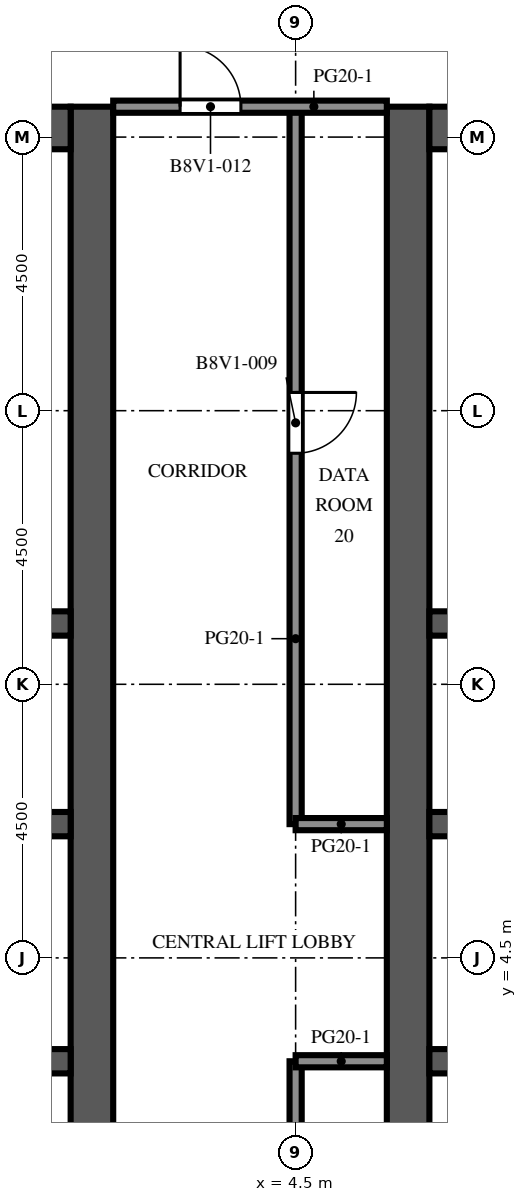
"""IFC4 building model, lengths in metres.
Left out: names, types, materials, properties, quantities, classifications, styles, units other than length and angle.
Written with IfcOpenShell. Run it as: python <this file> out.ifc"""

import sys

from ifc_helpers import new_model, si_unit, direction, frame, frame_2d, origin, place, context, subcontext, project, spatial, rectangle, extrude, element, fill, save


model = new_model("IFC4")
c1 = context("Model", 3, precision=1e-05, world=origin(), true_north=direction((0.0, 1.0)))
c2 = subcontext(c1, "Body", "Model", "MODEL_VIEW")
j1 = project(units=[si_unit("LENGTHUNIT", "METRE"), si_unit("PLANEANGLEUNIT", "RADIAN")], contexts=[c1])
p1 = place(None, origin())
s1 = spatial("IfcSite", under=j1, at=p1, CompositionType="ELEMENT")
p2 = place(p1, origin())
s2 = spatial("IfcBuilding", under=s1, at=p2, CompositionType="ELEMENT")
p3 = place(p2, frame((0.0, 0.0, 270.4)))
s3 = spatial("IfcBuildingStorey", under=s2, at=p3, CompositionType="ELEMENT", Elevation=270.4)
p4 = place(p3, frame((1.15, -9.0, 0.0), z_axis=(0.0, 0.0, 1.0), x_axis=(0.0, 1.0, 0.0)))
e1 = element("IfcWall", 1, at=p4, inside=s3, PredefinedType="SHEAR", context=c2, shape_type="SweptSolid", body=[
    extrude(rectangle(XDim=27.5, YDim=0.7, at=frame_2d((13.75, 0.0))), origin(), (0.0, 0.0, 1.0), 4.1),
])
p5 = place(p4, frame((12.55, 0.0, 0.0)))
e2 = element("IfcOpeningElement", 2, at=p5, cuts=e1, PredefinedType="OPENING", context=c2, shape_type="SweptSolid", body=[
    extrude(rectangle(XDim=2.4, YDim=2.4, at=frame_2d((1.2, 1.2))), frame((0.0, 0.36, 0.0), z_axis=(0.0, -1.0, 0.0), x_axis=(1.0, 0.0, 0.0)), (0.0, 0.0, 1.0), 0.72),
])
p6 = place(p4, frame((3.9, 0.0, 0.0)))
e3 = element("IfcOpeningElement", 3, at=p6, cuts=e1, PredefinedType="OPENING", context=c2, shape_type="SweptSolid", body=[
    extrude(rectangle(XDim=1.2, YDim=2.1, at=frame_2d((0.6, 1.05))), frame((0.0, 0.36, 0.0), z_axis=(0.0, -1.0, 0.0), x_axis=(1.0, 0.0, 0.0)), (0.0, 0.0, 1.0), 0.72),
])
p7 = place(p4, frame((19.46, 0.0, 0.0)))
e4 = element("IfcOpeningElement", 4, at=p7, cuts=e1, PredefinedType="OPENING", context=c2, shape_type="SweptSolid", body=[
    extrude(rectangle(XDim=1.0, YDim=2.1, at=frame_2d((0.5, 1.05))), frame((0.0, 0.36, 0.0), z_axis=(0.0, -1.0, 0.0), x_axis=(1.0, 0.0, 0.0)), (0.0, 0.0, 1.0), 0.72),
])
p8 = place(p4, frame((21.17, 0.0, 0.0)))
e5 = element("IfcOpeningElement", 5, at=p8, cuts=e1, PredefinedType="OPENING", context=c2, shape_type="SweptSolid", body=[
    extrude(rectangle(XDim=1.0, YDim=2.1, at=frame_2d((0.5, 1.05))), frame((0.0, 0.36, 0.0), z_axis=(0.0, -1.0, 0.0), x_axis=(1.0, 0.0, 0.0)), (0.0, 0.0, 1.0), 0.72),
])
p9 = place(p4, frame((23.26, 0.0, 0.0)))
e6 = element("IfcOpeningElement", 6, at=p9, cuts=e1, PredefinedType="OPENING", context=c2, shape_type="SweptSolid", body=[
    extrude(rectangle(XDim=1.0, YDim=2.1, at=frame_2d((0.5, 1.05))), frame((0.0, 0.36, 0.0), z_axis=(0.0, -1.0, 0.0), x_axis=(1.0, 0.0, 0.0)), (0.0, 0.0, 1.0), 0.72),
])
p10 = place(p4, frame((25.35, 0.0, 0.0)))
e7 = element("IfcOpeningElement", 7, at=p10, cuts=e1, PredefinedType="OPENING", context=c2, shape_type="SweptSolid", body=[
    extrude(rectangle(XDim=1.0, YDim=2.1, at=frame_2d((0.5, 1.05))), frame((0.0, 0.36, 0.0), z_axis=(0.0, -1.0, 0.0), x_axis=(1.0, 0.0, 0.0)), (0.0, 0.0, 1.0), 0.72),
])
p11 = place(p3, frame((-9.8, 18.15, 0.0), z_axis=(0.0, 0.0, 1.0), x_axis=(1.0, 0.0, 0.0)))
e8 = element("IfcWall", 8, at=p11, inside=s3, PredefinedType="SHEAR", context=c2, shape_type="SweptSolid", body=[
    extrude(rectangle(XDim=10.6, YDim=0.7, at=frame_2d((5.3, 0.0))), origin(), (0.0, 0.0, 1.0), 4.1),
])
p12 = place(p3, frame((-9.8, 2.8, 0.0), z_axis=(0.0, 0.0, 1.0), x_axis=(1.0, 0.0, 0.0)))
e9 = element("IfcWall", 9, at=p12, inside=s3, PredefinedType="SHEAR", context=c2, shape_type="SweptSolid", body=[
    extrude(rectangle(XDim=10.6, YDim=0.4, at=frame_2d((5.3, 0.0))), origin(), (0.0, 0.0, 1.0), 4.1),
])
p13 = place(p12, frame((0.688, 0.0, 0.0)))
e10 = element("IfcOpeningElement", 10, at=p13, cuts=e9, PredefinedType="OPENING", context=c2, shape_type="SweptSolid", body=[
    extrude(rectangle(XDim=1.1, YDim=2.1, at=frame_2d((0.55, 1.05))), frame((0.0, 0.21, 0.0), z_axis=(0.0, -1.0, 0.0), x_axis=(1.0, 0.0, 0.0)), (0.0, 0.0, 1.0), 0.42),
])
p14 = place(p12, frame((3.438, 0.0, 0.0)))
e11 = element("IfcOpeningElement", 11, at=p14, cuts=e9, PredefinedType="OPENING", context=c2, shape_type="SweptSolid", body=[
    extrude(rectangle(XDim=1.1, YDim=2.1, at=frame_2d((0.55, 1.05))), frame((0.0, 0.21, 0.0), z_axis=(0.0, -1.0, 0.0), x_axis=(1.0, 0.0, 0.0)), (0.0, 0.0, 1.0), 0.42),
])
p15 = place(p12, frame((6.113, 0.0, 0.0)))
e12 = element("IfcOpeningElement", 12, at=p15, cuts=e9, PredefinedType="OPENING", context=c2, shape_type="SweptSolid", body=[
    extrude(rectangle(XDim=1.0, YDim=2.1, at=frame_2d((0.5, 1.05))), frame((0.0, 0.21, 0.0), z_axis=(0.0, -1.0, 0.0), x_axis=(1.0, 0.0, 0.0)), (0.0, 0.0, 1.0), 0.42),
])
p16 = place(p12, frame((8.863, 0.0, 0.0)))
e13 = element("IfcOpeningElement", 13, at=p16, cuts=e9, PredefinedType="OPENING", context=c2, shape_type="SweptSolid", body=[
    extrude(rectangle(XDim=1.0, YDim=2.1, at=frame_2d((0.5, 1.05))), frame((0.0, 0.21, 0.0), z_axis=(0.0, -1.0, 0.0), x_axis=(1.0, 0.0, 0.0)), (0.0, 0.0, 1.0), 0.42),
])
p17 = place(p3, frame((-9.8, 6.7, 0.0), z_axis=(0.0, 0.0, 1.0), x_axis=(1.0, 0.0, 0.0)))
e14 = element("IfcWall", 14, at=p17, inside=s3, PredefinedType="SHEAR", context=c2, shape_type="SweptSolid", body=[
    extrude(rectangle(XDim=10.6, YDim=0.4, at=frame_2d((5.3, 0.0))), origin(), (0.0, 0.0, 1.0), 4.1),
])
p18 = place(p17, frame((3.438, 0.0, 0.0)))
e15 = element("IfcOpeningElement", 15, at=p18, cuts=e14, PredefinedType="OPENING", context=c2, shape_type="SweptSolid", body=[
    extrude(rectangle(XDim=1.1, YDim=2.1, at=frame_2d((0.55, 1.05))), frame((0.0, 0.21, 0.0), z_axis=(0.0, -1.0, 0.0), x_axis=(1.0, 0.0, 0.0)), (0.0, 0.0, 1.0), 0.42),
])
p19 = place(p17, frame((6.062, 0.0, 0.0)))
e16 = element("IfcOpeningElement", 16, at=p19, cuts=e14, PredefinedType="OPENING", context=c2, shape_type="SweptSolid", body=[
    extrude(rectangle(XDim=1.1, YDim=2.1, at=frame_2d((0.55, 1.05))), frame((0.0, 0.21, 0.0), z_axis=(0.0, -1.0, 0.0), x_axis=(1.0, 0.0, 0.0)), (0.0, 0.0, 1.0), 0.42),
])
p20 = place(p17, frame((8.812, 0.0, 0.0)))
e17 = element("IfcOpeningElement", 17, at=p20, cuts=e14, PredefinedType="OPENING", context=c2, shape_type="SweptSolid", body=[
    extrude(rectangle(XDim=1.1, YDim=2.1, at=frame_2d((0.55, 1.05))), frame((0.0, 0.21, 0.0), z_axis=(0.0, -1.0, 0.0), x_axis=(1.0, 0.0, 0.0)), (0.0, 0.0, 1.0), 0.42),
])
p21 = place(p17, frame((0.738, 0.0, 0.0)))
e18 = element("IfcOpeningElement", 18, at=p21, cuts=e14, PredefinedType="OPENING", context=c2, shape_type="SweptSolid", body=[
    extrude(rectangle(XDim=1.0, YDim=2.1, at=frame_2d((0.5, 1.05))), frame((0.0, 0.21, 0.0), z_axis=(0.0, -1.0, 0.0), x_axis=(1.0, 0.0, 0.0)), (0.0, 0.0, 1.0), 0.42),
])
p22 = place(p3, frame((-9.8, 10.0, 0.0), z_axis=(0.0, 0.0, 1.0), x_axis=(1.0, 0.0, 0.0)))
e19 = element("IfcWall", 19, at=p22, inside=s3, PredefinedType="SHEAR", context=c2, shape_type="SweptSolid", body=[
    extrude(rectangle(XDim=10.6, YDim=0.4, at=frame_2d((5.3, 0.0))), origin(), (0.0, 0.0, 1.0), 4.1),
])
p23 = place(p3, frame((6.35, -9.0, 0.0), z_axis=(0.0, 0.0, 1.0), x_axis=(0.0, 1.0, 0.0)))
e20 = element("IfcWall", 20, at=p23, inside=s3, PredefinedType="SHEAR", context=c2, shape_type="SweptSolid", body=[
    extrude(rectangle(XDim=27.5, YDim=0.7, at=frame_2d((13.75, 0.0))), origin(), (0.0, 0.0, 1.0), 4.1),
])
p24 = place(p23, frame((12.55, 0.0, 0.0)))
e21 = element("IfcOpeningElement", 21, at=p24, cuts=e20, PredefinedType="OPENING", context=c2, shape_type="SweptSolid", body=[
    extrude(rectangle(XDim=2.4, YDim=2.4, at=frame_2d((1.2, 1.2))), frame((0.0, 0.36, 0.0), z_axis=(0.0, -1.0, 0.0), x_axis=(1.0, 0.0, 0.0)), (0.0, 0.0, 1.0), 0.72),
])
p25 = place(p23, frame((3.9, 0.0, 0.0)))
e22 = element("IfcOpeningElement", 22, at=p25, cuts=e20, PredefinedType="OPENING", context=c2, shape_type="SweptSolid", body=[
    extrude(rectangle(XDim=1.2, YDim=2.1, at=frame_2d((0.6, 1.05))), frame((0.0, 0.36, 0.0), z_axis=(0.0, -1.0, 0.0), x_axis=(1.0, 0.0, 0.0)), (0.0, 0.0, 1.0), 0.72),
])
p26 = place(p23, frame((19.46, 0.0, 0.0)))
e23 = element("IfcOpeningElement", 23, at=p26, cuts=e20, PredefinedType="OPENING", context=c2, shape_type="SweptSolid", body=[
    extrude(rectangle(XDim=1.0, YDim=2.1, at=frame_2d((0.5, 1.05))), frame((0.0, 0.36, 0.0), z_axis=(0.0, -1.0, 0.0), x_axis=(1.0, 0.0, 0.0)), (0.0, 0.0, 1.0), 0.72),
])
p27 = place(p23, frame((21.17, 0.0, 0.0)))
e24 = element("IfcOpeningElement", 24, at=p27, cuts=e20, PredefinedType="OPENING", context=c2, shape_type="SweptSolid", body=[
    extrude(rectangle(XDim=1.0, YDim=2.1, at=frame_2d((0.5, 1.05))), frame((0.0, 0.36, 0.0), z_axis=(0.0, -1.0, 0.0), x_axis=(1.0, 0.0, 0.0)), (0.0, 0.0, 1.0), 0.72),
])
p28 = place(p23, frame((23.26, 0.0, 0.0)))
e25 = element("IfcOpeningElement", 25, at=p28, cuts=e20, PredefinedType="OPENING", context=c2, shape_type="SweptSolid", body=[
    extrude(rectangle(XDim=1.0, YDim=2.1, at=frame_2d((0.5, 1.05))), frame((0.0, 0.36, 0.0), z_axis=(0.0, -1.0, 0.0), x_axis=(1.0, 0.0, 0.0)), (0.0, 0.0, 1.0), 0.72),
])
p29 = place(p23, frame((25.35, 0.0, 0.0)))
e26 = element("IfcOpeningElement", 26, at=p29, cuts=e20, PredefinedType="OPENING", context=c2, shape_type="SweptSolid", body=[
    extrude(rectangle(XDim=1.0, YDim=2.1, at=frame_2d((0.5, 1.05))), frame((0.0, 0.36, 0.0), z_axis=(0.0, -1.0, 0.0), x_axis=(1.0, 0.0, 0.0)), (0.0, 0.0, 1.0), 0.72),
])
p30 = place(p3, frame((6.7, 18.15, 0.0), z_axis=(0.0, 0.0, 1.0), x_axis=(1.0, 0.0, 0.0)))
e27 = element("IfcWall", 27, at=p30, inside=s3, PredefinedType="SHEAR", context=c2, shape_type="SweptSolid", body=[
    extrude(rectangle(XDim=10.6, YDim=0.7, at=frame_2d((5.3, 0.0))), origin(), (0.0, 0.0, 1.0), 4.1),
])
p31 = place(p3, frame((6.7, 2.8, 0.0), z_axis=(0.0, 0.0, 1.0), x_axis=(1.0, 0.0, 0.0)))
e28 = element("IfcWall", 28, at=p31, inside=s3, PredefinedType="SHEAR", context=c2, shape_type="SweptSolid", body=[
    extrude(rectangle(XDim=10.6, YDim=0.4, at=frame_2d((5.3, 0.0))), origin(), (0.0, 0.0, 1.0), 4.1),
])
p32 = place(p31, frame((0.688, 0.0, 0.0)))
e29 = element("IfcOpeningElement", 29, at=p32, cuts=e28, PredefinedType="OPENING", context=c2, shape_type="SweptSolid", body=[
    extrude(rectangle(XDim=1.1, YDim=2.1, at=frame_2d((0.55, 1.05))), frame((0.0, 0.21, 0.0), z_axis=(0.0, -1.0, 0.0), x_axis=(1.0, 0.0, 0.0)), (0.0, 0.0, 1.0), 0.42),
])
p33 = place(p31, frame((3.438, 0.0, 0.0)))
e30 = element("IfcOpeningElement", 30, at=p33, cuts=e28, PredefinedType="OPENING", context=c2, shape_type="SweptSolid", body=[
    extrude(rectangle(XDim=1.1, YDim=2.1, at=frame_2d((0.55, 1.05))), frame((0.0, 0.21, 0.0), z_axis=(0.0, -1.0, 0.0), x_axis=(1.0, 0.0, 0.0)), (0.0, 0.0, 1.0), 0.42),
])
p34 = place(p31, frame((6.113, 0.0, 0.0)))
e31 = element("IfcOpeningElement", 31, at=p34, cuts=e28, PredefinedType="OPENING", context=c2, shape_type="SweptSolid", body=[
    extrude(rectangle(XDim=1.0, YDim=2.1, at=frame_2d((0.5, 1.05))), frame((0.0, 0.21, 0.0), z_axis=(0.0, -1.0, 0.0), x_axis=(1.0, 0.0, 0.0)), (0.0, 0.0, 1.0), 0.42),
])
p35 = place(p31, frame((8.863, 0.0, 0.0)))
e32 = element("IfcOpeningElement", 32, at=p35, cuts=e28, PredefinedType="OPENING", context=c2, shape_type="SweptSolid", body=[
    extrude(rectangle(XDim=1.0, YDim=2.1, at=frame_2d((0.5, 1.05))), frame((0.0, 0.21, 0.0), z_axis=(0.0, -1.0, 0.0), x_axis=(1.0, 0.0, 0.0)), (0.0, 0.0, 1.0), 0.42),
])
p36 = place(p3, frame((6.7, 6.7, 0.0), z_axis=(0.0, 0.0, 1.0), x_axis=(1.0, 0.0, 0.0)))
e33 = element("IfcWall", 33, at=p36, inside=s3, PredefinedType="SHEAR", context=c2, shape_type="SweptSolid", body=[
    extrude(rectangle(XDim=10.6, YDim=0.4, at=frame_2d((5.3, 0.0))), origin(), (0.0, 0.0, 1.0), 4.1),
])
p37 = place(p36, frame((3.438, 0.0, 0.0)))
e34 = element("IfcOpeningElement", 34, at=p37, cuts=e33, PredefinedType="OPENING", context=c2, shape_type="SweptSolid", body=[
    extrude(rectangle(XDim=1.1, YDim=2.1, at=frame_2d((0.55, 1.05))), frame((0.0, 0.21, 0.0), z_axis=(0.0, -1.0, 0.0), x_axis=(1.0, 0.0, 0.0)), (0.0, 0.0, 1.0), 0.42),
])
p38 = place(p36, frame((6.062, 0.0, 0.0)))
e35 = element("IfcOpeningElement", 35, at=p38, cuts=e33, PredefinedType="OPENING", context=c2, shape_type="SweptSolid", body=[
    extrude(rectangle(XDim=1.1, YDim=2.1, at=frame_2d((0.55, 1.05))), frame((0.0, 0.21, 0.0), z_axis=(0.0, -1.0, 0.0), x_axis=(1.0, 0.0, 0.0)), (0.0, 0.0, 1.0), 0.42),
])
p39 = place(p36, frame((8.812, 0.0, 0.0)))
e36 = element("IfcOpeningElement", 36, at=p39, cuts=e33, PredefinedType="OPENING", context=c2, shape_type="SweptSolid", body=[
    extrude(rectangle(XDim=1.1, YDim=2.1, at=frame_2d((0.55, 1.05))), frame((0.0, 0.21, 0.0), z_axis=(0.0, -1.0, 0.0), x_axis=(1.0, 0.0, 0.0)), (0.0, 0.0, 1.0), 0.42),
])
p40 = place(p36, frame((0.738, 0.0, 0.0)))
e37 = element("IfcOpeningElement", 37, at=p40, cuts=e33, PredefinedType="OPENING", context=c2, shape_type="SweptSolid", body=[
    extrude(rectangle(XDim=1.0, YDim=2.1, at=frame_2d((0.5, 1.05))), frame((0.0, 0.21, 0.0), z_axis=(0.0, -1.0, 0.0), x_axis=(1.0, 0.0, 0.0)), (0.0, 0.0, 1.0), 0.42),
])
p41 = place(p3, frame((6.7, 10.0, 0.0), z_axis=(0.0, 0.0, 1.0), x_axis=(1.0, 0.0, 0.0)))
e38 = element("IfcWall", 38, at=p41, inside=s3, PredefinedType="SHEAR", context=c2, shape_type="SweptSolid", body=[
    extrude(rectangle(XDim=10.6, YDim=0.4, at=frame_2d((5.3, 0.0))), origin(), (0.0, 0.0, 1.0), 4.1),
])
for number, where, z_axis, x_axis in (
    (39, (-4.3, 11.72, 0.0), (0.0, 0.0, 1.0), (1.0, 0.0, 0.0)),
    (40, (-4.3, 13.62, 0.0), (0.0, 0.0, 1.0), (1.0, 0.0, 0.0)),
    (41, (-4.3, 15.9, 0.0), (0.0, 0.0, 1.0), (1.0, 0.0, 0.0)),
    (42, (6.7, 11.72, 0.0), (0.0, 0.0, 1.0), (1.0, 0.0, 0.0)),
    (43, (6.7, 13.62, 0.0), (0.0, 0.0, 1.0), (1.0, 0.0, 0.0)),
    (44, (6.7, 15.9, 0.0), (0.0, 0.0, 1.0), (1.0, 0.0, 0.0)),
):
    element("IfcWall", number, at=place(p3, frame(where, z_axis=z_axis, x_axis=x_axis)), inside=s3, PredefinedType="PARTITIONING", context=c2, shape_type="SweptSolid", body=[
        extrude(rectangle(XDim=5.1, YDim=0.1, at=frame_2d((2.55, 0.0))), origin(), (0.0, 0.0, 1.0), 3.65),
    ])
p42 = place(p3, frame((4.5, 2.8, 0.0), z_axis=(0.0, 0.0, 1.0), x_axis=(0.0, -1.0, 0.0)))
e45 = element("IfcWall", 45, at=p42, inside=s3, PredefinedType="PARTITIONING", context=c2, shape_type="SweptSolid", body=[
    extrude(rectangle(XDim=6.3, YDim=0.2, at=frame_2d((3.15, 0.0))), origin(), (0.0, 0.0, 1.0), 3.65),
])
p43 = place(p42, frame((2.45, 0.0, 0.0)))
e46 = element("IfcOpeningElement", 46, at=p43, cuts=e45, PredefinedType="OPENING", context=c2, shape_type="SweptSolid", body=[
    extrude(rectangle(XDim=1.0, YDim=2.1, at=frame_2d((0.5, 1.05))), frame((0.0, 0.11, 0.0), z_axis=(0.0, -1.0, 0.0), x_axis=(1.0, 0.0, 0.0)), (0.0, 0.0, 1.0), 0.22),
])
p44 = place(p3, frame((4.5, 18.5, 0.0), z_axis=(0.0, 0.0, 1.0), x_axis=(0.0, -1.0, 0.0)))
e47 = element("IfcWall", 47, at=p44, inside=s3, PredefinedType="PARTITIONING", context=c2, shape_type="SweptSolid", body=[
    extrude(rectangle(XDim=11.8, YDim=0.2, at=frame_2d((5.9, 0.0))), origin(), (0.0, 0.0, 1.0), 3.65),
])
p45 = place(p44, frame((4.7, 0.0, 0.0)))
e48 = element("IfcOpeningElement", 48, at=p45, cuts=e47, PredefinedType="OPENING", context=c2, shape_type="SweptSolid", body=[
    extrude(rectangle(XDim=1.0, YDim=2.1, at=frame_2d((0.5, 1.05))), frame((0.0, 0.11, 0.0), z_axis=(0.0, -1.0, 0.0), x_axis=(1.0, 0.0, 0.0)), (0.0, 0.0, 1.0), 0.22),
])
for number, where, z_axis, x_axis in (
    (49, (4.5, 2.8, 0.0), (0.0, 0.0, 1.0), (1.0, 0.0, 0.0)),
    (50, (4.5, 6.7, 0.0), (0.0, 0.0, 1.0), (1.0, 0.0, 0.0)),
):
    element("IfcWall", number, at=place(p3, frame(where, z_axis=z_axis, x_axis=x_axis)), inside=s3, PredefinedType="PARTITIONING", context=c2, shape_type="SweptSolid", body=[
        extrude(rectangle(XDim=1.5, YDim=0.2, at=frame_2d((0.75, 0.0))), origin(), (0.0, 0.0, 1.0), 3.65),
    ])
p46 = place(p3, frame((1.5, 18.5, 0.0), z_axis=(0.0, 0.0, 1.0), x_axis=(1.0, 0.0, 0.0)))
e51 = element("IfcWall", 51, at=p46, inside=s3, PredefinedType="PARTITIONING", context=c2, shape_type="SweptSolid", body=[
    extrude(rectangle(XDim=4.5, YDim=0.2, at=frame_2d((2.25, 0.0))), origin(), (0.0, 0.0, 1.0), 3.65),
])
p47 = place(p46, frame((1.1, 0.0, 0.0)))
e52 = element("IfcOpeningElement", 52, at=p47, cuts=e51, PredefinedType="OPENING", context=c2, shape_type="SweptSolid", body=[
    extrude(rectangle(XDim=1.0, YDim=2.1, at=frame_2d((0.5, 1.05))), frame((0.0, 0.11, 0.0), z_axis=(0.0, -1.0, 0.0), x_axis=(1.0, 0.0, 0.0)), (0.0, 0.0, 1.0), 0.22),
])
p48 = place(p5, origin())
e53 = element("IfcDoor", 53, at=p48, inside=s3, OperationType="DOUBLE_DOOR_DOUBLE_SWING", PredefinedType="DOOR", context=c2, shape_type="SweptSolid", body=[
    extrude(rectangle(XDim=2.4, YDim=2.4, at=frame_2d((1.2, 1.2))), frame((0.0, 0.025, 0.0), z_axis=(0.0, -1.0, 0.0), x_axis=(1.0, 0.0, 0.0)), (0.0, 0.0, 1.0), 0.05),
])
fill(e2, e53)
p49 = place(p24, origin())
e54 = element("IfcDoor", 54, at=p49, inside=s3, OperationType="DOUBLE_DOOR_DOUBLE_SWING", PredefinedType="DOOR", context=c2, shape_type="SweptSolid", body=[
    extrude(rectangle(XDim=2.4, YDim=2.4, at=frame_2d((1.2, 1.2))), frame((0.0, 0.025, 0.0), z_axis=(0.0, -1.0, 0.0), x_axis=(1.0, 0.0, 0.0)), (0.0, 0.0, 1.0), 0.05),
])
fill(e21, e54)
p50 = place(p7, origin())
e55 = element("IfcDoor", 55, at=p50, inside=s3, OperationType="SINGLE_SWING_LEFT", PredefinedType="DOOR", context=c2, shape_type="SweptSolid", body=[
    extrude(rectangle(XDim=1.0, YDim=2.1, at=frame_2d((0.5, 1.05))), frame((0.0, 0.325, 0.0), z_axis=(0.0, -1.0, 0.0), x_axis=(1.0, 0.0, 0.0)), (0.0, 0.0, 1.0), 0.05),
])
fill(e4, e55)
p51 = place(p8, origin())
e56 = element("IfcDoor", 56, at=p51, inside=s3, OperationType="SINGLE_SWING_RIGHT", PredefinedType="DOOR", context=c2, shape_type="SweptSolid", body=[
    extrude(rectangle(XDim=1.0, YDim=2.1, at=frame_2d((0.5, 1.05))), frame((0.0, 0.325, 0.0), z_axis=(0.0, -1.0, 0.0), x_axis=(1.0, 0.0, 0.0)), (0.0, 0.0, 1.0), 0.05),
])
fill(e5, e56)
p52 = place(p9, origin())
e57 = element("IfcDoor", 57, at=p52, inside=s3, OperationType="SINGLE_SWING_LEFT", PredefinedType="DOOR", context=c2, shape_type="SweptSolid", body=[
    extrude(rectangle(XDim=1.0, YDim=2.1, at=frame_2d((0.5, 1.05))), frame((0.0, 0.325, 0.0), z_axis=(0.0, -1.0, 0.0), x_axis=(1.0, 0.0, 0.0)), (0.0, 0.0, 1.0), 0.05),
])
fill(e6, e57)
p53 = place(p10, origin())
e58 = element("IfcDoor", 58, at=p53, inside=s3, OperationType="SINGLE_SWING_RIGHT", PredefinedType="DOOR", context=c2, shape_type="SweptSolid", body=[
    extrude(rectangle(XDim=1.0, YDim=2.1, at=frame_2d((0.5, 1.05))), frame((0.0, 0.325, 0.0), z_axis=(0.0, -1.0, 0.0), x_axis=(1.0, 0.0, 0.0)), (0.0, 0.0, 1.0), 0.05),
])
fill(e7, e58)
p54 = place(p26, origin())
e59 = element("IfcDoor", 59, at=p54, inside=s3, OperationType="SINGLE_SWING_RIGHT", PredefinedType="DOOR", context=c2, shape_type="SweptSolid", body=[
    extrude(rectangle(XDim=1.0, YDim=2.1, at=frame_2d((0.5, 1.05))), frame((0.0, -0.275, 0.0), z_axis=(0.0, -1.0, 0.0), x_axis=(1.0, 0.0, 0.0)), (0.0, 0.0, 1.0), 0.05),
])
fill(e23, e59)
p55 = place(p27, origin())
e60 = element("IfcDoor", 60, at=p55, inside=s3, OperationType="SINGLE_SWING_LEFT", PredefinedType="DOOR", context=c2, shape_type="SweptSolid", body=[
    extrude(rectangle(XDim=1.0, YDim=2.1, at=frame_2d((0.5, 1.05))), frame((0.0, -0.275, 0.0), z_axis=(0.0, -1.0, 0.0), x_axis=(1.0, 0.0, 0.0)), (0.0, 0.0, 1.0), 0.05),
])
fill(e24, e60)
p56 = place(p28, origin())
e61 = element("IfcDoor", 61, at=p56, inside=s3, OperationType="SINGLE_SWING_RIGHT", PredefinedType="DOOR", context=c2, shape_type="SweptSolid", body=[
    extrude(rectangle(XDim=1.0, YDim=2.1, at=frame_2d((0.5, 1.05))), frame((0.0, -0.275, 0.0), z_axis=(0.0, -1.0, 0.0), x_axis=(1.0, 0.0, 0.0)), (0.0, 0.0, 1.0), 0.05),
])
fill(e25, e61)
p57 = place(p29, origin())
e62 = element("IfcDoor", 62, at=p57, inside=s3, OperationType="SINGLE_SWING_LEFT", PredefinedType="DOOR", context=c2, shape_type="SweptSolid", body=[
    extrude(rectangle(XDim=1.0, YDim=2.1, at=frame_2d((0.5, 1.05))), frame((0.0, -0.275, 0.0), z_axis=(0.0, -1.0, 0.0), x_axis=(1.0, 0.0, 0.0)), (0.0, 0.0, 1.0), 0.05),
])
fill(e26, e62)
p58 = place(p45, origin())
e63 = element("IfcDoor", 63, at=p58, inside=s3, OperationType="SINGLE_SWING_LEFT", PredefinedType="DOOR", context=c2, shape_type="SweptSolid", body=[
    extrude(rectangle(XDim=1.0, YDim=2.1, at=frame_2d((0.5, 1.05))), frame((0.0, 0.025, 0.0), z_axis=(0.0, -1.0, 0.0), x_axis=(1.0, 0.0, 0.0)), (0.0, 0.0, 1.0), 0.05),
])
fill(e48, e63)
p59 = place(p47, origin())
e64 = element("IfcDoor", 64, at=p59, inside=s3, OperationType="SINGLE_SWING_LEFT", PredefinedType="DOOR", context=c2, shape_type="SweptSolid", body=[
    extrude(rectangle(XDim=1.0, YDim=2.1, at=frame_2d((0.5, 1.05))), frame((0.0, 0.025, 0.0), z_axis=(0.0, -1.0, 0.0), x_axis=(1.0, 0.0, 0.0)), (0.0, 0.0, 1.0), 0.05),
])
fill(e52, e64)
save(model, sys.argv[1])
